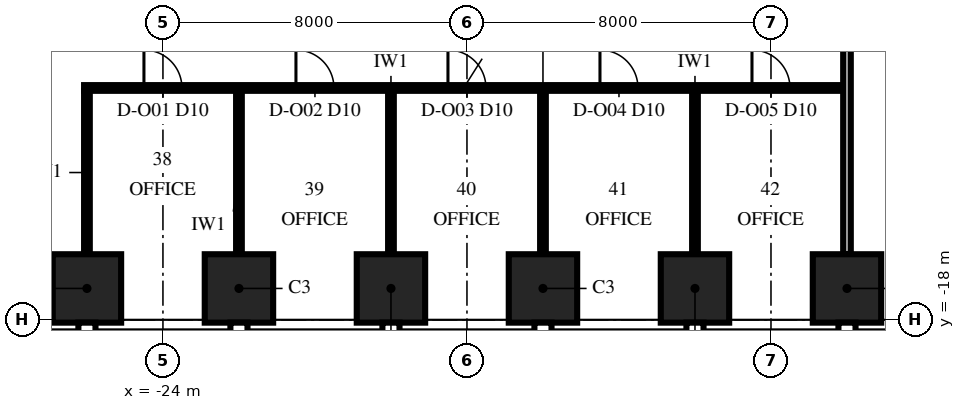
"""IFC4 building model, lengths in metres.
Left out: names, types, materials, properties, quantities, classifications, styles, units other than length and angle.
Written with IfcOpenShell. Run it as: python <this file> out.ifc"""

import sys

from ifc_helpers import new_model, si_unit, direction, frame, frame_2d, origin, origin_2d, place, context, subcontext, project, spatial, rectangle, extrude, element, fill, save


model = new_model("IFC4")
c1 = context("Model", 3, precision=1e-05, world=origin(), true_north=direction((0.0, 1.0)))
c2 = subcontext(c1, "Body", "Model", "MODEL_VIEW")
j1 = project(units=[si_unit("LENGTHUNIT", "METRE"), si_unit("PLANEANGLEUNIT", "RADIAN")], contexts=[c1])
p1 = place(None, origin())
s1 = spatial("IfcSite", under=j1, at=p1, CompositionType="ELEMENT")
p2 = place(p1, origin())
s2 = spatial("IfcBuilding", under=s1, at=p2, CompositionType="ELEMENT")
p3 = place(p2, frame((0.0, 0.0, 103.0)))
s3 = spatial("IfcBuildingStorey", under=s2, at=p3, CompositionType="ELEMENT", Elevation=103.0)
for number, where, z_axis, x_axis in (
    (1, (-26.0, -17.175, 0.0), (0.0, 0.0, 1.0), (1.0, 0.0, 0.0)),
    (2, (-22.0, -17.175, 0.0), (0.0, 0.0, 1.0), (1.0, 0.0, 0.0)),
    (3, (-18.0, -17.175, 0.0), (0.0, 0.0, 1.0), (1.0, 0.0, 0.0)),
    (4, (-14.0, -17.175, 0.0), (0.0, 0.0, 1.0), (1.0, 0.0, 0.0)),
    (5, (-10.0, -17.175, 0.0), (0.0, 0.0, 1.0), (1.0, 0.0, 0.0)),
    (6, (-6.0, -17.175, 0.0), (0.0, 0.0, 1.0), (1.0, 0.0, 0.0)),
):
    element("IfcColumn", number, at=place(p3, frame(where, z_axis=z_axis, x_axis=x_axis)), inside=s3, PredefinedType="COLUMN", context=c2, shape_type="SweptSolid", body=[
        extrude(rectangle(XDim=1.8, YDim=1.8, at=origin_2d()), origin(), (0.0, 0.0, 1.0), 4.0),
    ])
p4 = place(p3, frame((-26.075, -11.9, 0.0), z_axis=(0.0, 0.0, 1.0), x_axis=(1.0, 0.0, 0.0)))
e7 = element("IfcWall", 7, at=p4, inside=s3, PredefinedType="PARTITIONING", context=c2, shape_type="SweptSolid", body=[
    extrude(rectangle(XDim=19.975, YDim=0.15, at=frame_2d((9.987, 0.0))), origin(), (0.0, 0.0, 1.0), 3.25),
])
p5 = place(p4, frame((1.575, 0.0, 0.0)))
e8 = element("IfcOpeningElement", 8, at=p5, cuts=e7, PredefinedType="OPENING", context=c2, shape_type="SweptSolid", body=[
    extrude(rectangle(XDim=1.0, YDim=2.3, at=frame_2d((0.5, 1.15))), frame((0.0, 0.09, 0.0), z_axis=(0.0, -1.0, 0.0), x_axis=(1.0, 0.0, 0.0)), (0.0, 0.0, 1.0), 0.18),
])
p6 = place(p4, frame((5.575, 0.0, 0.0)))
e9 = element("IfcOpeningElement", 9, at=p6, cuts=e7, PredefinedType="OPENING", context=c2, shape_type="SweptSolid", body=[
    extrude(rectangle(XDim=1.0, YDim=2.3, at=frame_2d((0.5, 1.15))), frame((0.0, 0.09, 0.0), z_axis=(0.0, -1.0, 0.0), x_axis=(1.0, 0.0, 0.0)), (0.0, 0.0, 1.0), 0.18),
])
p7 = place(p4, frame((9.575, 0.0, 0.0)))
e10 = element("IfcOpeningElement", 10, at=p7, cuts=e7, PredefinedType="OPENING", context=c2, shape_type="SweptSolid", body=[
    extrude(rectangle(XDim=1.0, YDim=2.3, at=frame_2d((0.5, 1.15))), frame((0.0, 0.09, 0.0), z_axis=(0.0, -1.0, 0.0), x_axis=(1.0, 0.0, 0.0)), (0.0, 0.0, 1.0), 0.18),
])
p8 = place(p4, frame((13.575, 0.0, 0.0)))
e11 = element("IfcOpeningElement", 11, at=p8, cuts=e7, PredefinedType="OPENING", context=c2, shape_type="SweptSolid", body=[
    extrude(rectangle(XDim=1.0, YDim=2.3, at=frame_2d((0.5, 1.15))), frame((0.0, 0.09, 0.0), z_axis=(0.0, -1.0, 0.0), x_axis=(1.0, 0.0, 0.0)), (0.0, 0.0, 1.0), 0.18),
])
p9 = place(p4, frame((17.575, 0.0, 0.0)))
e12 = element("IfcOpeningElement", 12, at=p9, cuts=e7, PredefinedType="OPENING", context=c2, shape_type="SweptSolid", body=[
    extrude(rectangle(XDim=1.0, YDim=2.3, at=frame_2d((0.5, 1.15))), frame((0.0, 0.09, 0.0), z_axis=(0.0, -1.0, 0.0), x_axis=(1.0, 0.0, 0.0)), (0.0, 0.0, 1.0), 0.18),
])
for number, where, z_axis, x_axis in (
    (13, (-26.0, -16.275, 0.0), (0.0, 0.0, 1.0), (0.0, 1.0, 0.0)),
    (14, (-22.0, -16.275, 0.0), (0.0, 0.0, 1.0), (0.0, 1.0, 0.0)),
    (15, (-18.0, -16.275, 0.0), (0.0, 0.0, 1.0), (0.0, 1.0, 0.0)),
    (16, (-14.0, -16.275, 0.0), (0.0, 0.0, 1.0), (0.0, 1.0, 0.0)),
    (17, (-10.0, -16.275, 0.0), (0.0, 0.0, 1.0), (0.0, 1.0, 0.0)),
):
    element("IfcWall", number, at=place(p3, frame(where, z_axis=z_axis, x_axis=x_axis)), inside=s3, PredefinedType="PARTITIONING", context=c2, shape_type="SweptSolid", body=[
        extrude(rectangle(XDim=4.3, YDim=0.15, at=frame_2d((2.15, 0.0))), origin(), (0.0, 0.0, 1.0), 3.25),
    ])
p10 = place(p3, frame((-6.0, -16.275, 0.0), z_axis=(0.0, 0.0, 1.0), x_axis=(0.0, 1.0, 0.0)))
e18 = element("IfcWall", 18, at=p10, inside=s3, PredefinedType="PARTITIONING", context=c2, shape_type="SweptSolid", body=[
    extrude(rectangle(XDim=19.975, YDim=0.2, at=frame_2d((9.987, 0.0))), origin(), (0.0, 0.0, 1.0), 2.842),
])
p11 = place(p5, origin())
e19 = element("IfcDoor", 19, at=p11, inside=s3, OperationType="SINGLE_SWING_LEFT", PredefinedType="DOOR", context=c2, shape_type="SweptSolid", body=[
    extrude(rectangle(XDim=1.0, YDim=2.3, at=frame_2d((0.5, 1.15))), frame((0.0, 0.075, 0.0), z_axis=(0.0, -1.0, 0.0), x_axis=(1.0, 0.0, 0.0)), (0.0, 0.0, 1.0), 0.149),
])
fill(e8, e19)
p12 = place(p6, origin())
e20 = element("IfcDoor", 20, at=p12, inside=s3, OperationType="SINGLE_SWING_LEFT", PredefinedType="DOOR", context=c2, shape_type="SweptSolid", body=[
    extrude(rectangle(XDim=1.0, YDim=2.3, at=frame_2d((0.5, 1.15))), frame((0.0, 0.075, 0.0), z_axis=(0.0, -1.0, 0.0), x_axis=(1.0, 0.0, 0.0)), (0.0, 0.0, 1.0), 0.149),
])
fill(e9, e20)
p13 = place(p7, origin())
e21 = element("IfcDoor", 21, at=p13, inside=s3, OperationType="SINGLE_SWING_LEFT", PredefinedType="DOOR", context=c2, shape_type="SweptSolid", body=[
    extrude(rectangle(XDim=1.0, YDim=2.3, at=frame_2d((0.5, 1.15))), frame((0.0, 0.075, 0.0), z_axis=(0.0, -1.0, 0.0), x_axis=(1.0, 0.0, 0.0)), (0.0, 0.0, 1.0), 0.149),
])
fill(e10, e21)
p14 = place(p8, origin())
e22 = element("IfcDoor", 22, at=p14, inside=s3, OperationType="SINGLE_SWING_LEFT", PredefinedType="DOOR", context=c2, shape_type="SweptSolid", body=[
    extrude(rectangle(XDim=1.0, YDim=2.3, at=frame_2d((0.5, 1.15))), frame((0.0, 0.075, 0.0), z_axis=(0.0, -1.0, 0.0), x_axis=(1.0, 0.0, 0.0)), (0.0, 0.0, 1.0), 0.149),
])
fill(e11, e22)
p15 = place(p9, origin())
e23 = element("IfcDoor", 23, at=p15, inside=s3, OperationType="SINGLE_SWING_LEFT", PredefinedType="DOOR", context=c2, shape_type="SweptSolid", body=[
    extrude(rectangle(XDim=1.0, YDim=2.3, at=frame_2d((0.5, 1.15))), frame((0.0, 0.075, 0.0), z_axis=(0.0, -1.0, 0.0), x_axis=(1.0, 0.0, 0.0)), (0.0, 0.0, 1.0), 0.149),
])
fill(e12, e23)
save(model, sys.argv[1])
